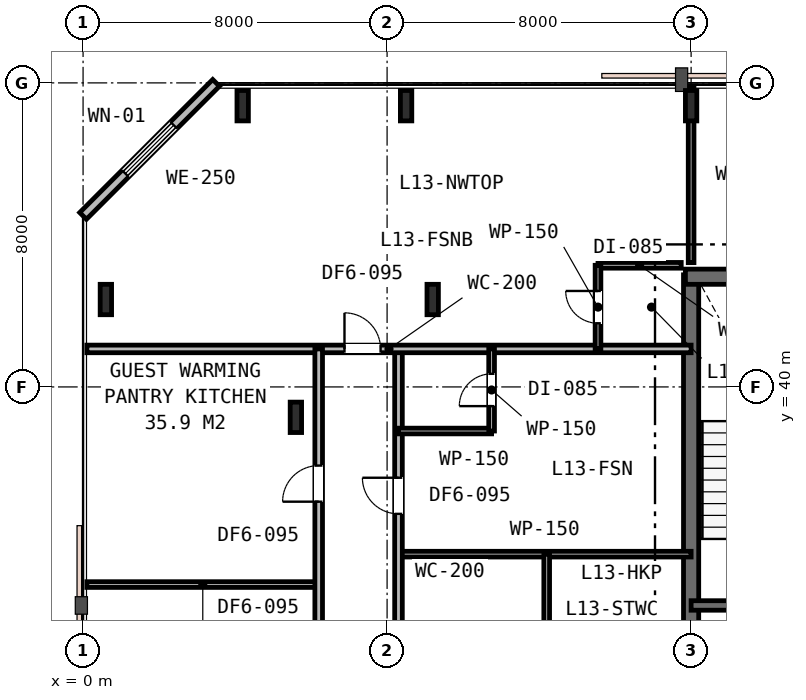
"""IFC4 building model, lengths in metres.
Left out: names, types, materials, properties, quantities, classifications, styles, units other than length and angle.
Written with IfcOpenShell. Run it as: python <this file> out.ifc"""

import sys

from ifc_helpers import new_model, si_unit, direction, frame, frame_2d, origin, origin_2d, place, context, subcontext, project, spatial, rectangle, i_section, extrude, element, fill, save


model = new_model("IFC4")
c1 = context("Model", 3, precision=1e-05, world=origin(), true_north=direction((0.0, 1.0)))
c2 = subcontext(c1, "Body", "Model", "MODEL_VIEW")
j1 = project(units=[si_unit("LENGTHUNIT", "METRE"), si_unit("PLANEANGLEUNIT", "RADIAN")], contexts=[c1])
p1 = place(None, origin())
s1 = spatial("IfcSite", under=j1, at=p1, CompositionType="ELEMENT")
p2 = place(p1, origin())
s2 = spatial("IfcBuilding", under=s1, at=p2, CompositionType="ELEMENT")
p3 = place(p2, frame((0.0, 0.0, 54.6)))
s3 = spatial("IfcBuildingStorey", under=s2, at=p3, CompositionType="ELEMENT", Elevation=54.6)
p4 = place(p3, frame((16.0, 30.65, 0.0), z_axis=(0.0, 0.0, 1.0), x_axis=(0.0, 1.0, 0.0)))
e1 = element("IfcWall", 1, at=p4, inside=s3, PredefinedType="SHEAR", context=c2, shape_type="SweptSolid", body=[
    extrude(rectangle(XDim=12.3, YDim=0.4, at=frame_2d((6.15, 0.0))), origin(), (0.0, 0.0, 1.0), 3.6),
])
p5 = place(p3, frame((15.85, 42.9, 0.0), z_axis=(0.0, 0.0, 1.0), x_axis=(1.0, 0.0, 0.0)))
e2 = element("IfcWall", 2, at=p5, inside=s3, PredefinedType="SHEAR", context=c2, shape_type="SweptSolid", body=[
    extrude(rectangle(XDim=24.3, YDim=0.4, at=frame_2d((12.15, 0.0))), origin(), (0.0, 0.0, 1.0), 3.6),
])
p6 = place(p3, frame((16.0, 34.25, 0.0), z_axis=(0.0, 0.0, 1.0), x_axis=(1.0, 0.0, 0.0)))
e3 = element("IfcWall", 3, at=p6, inside=s3, PredefinedType="SHEAR", context=c2, shape_type="SweptSolid", body=[
    extrude(rectangle(XDim=6.05, YDim=0.25, at=frame_2d((3.025, 0.0))), origin(), (0.0, 0.0, 1.0), 3.6),
])
p7 = place(p6, frame((1.25, 0.0, 0.0)))
e4 = element("IfcOpeningElement", 4, at=p7, cuts=e3, PredefinedType="OPENING", context=c2, shape_type="SweptSolid", body=[
    extrude(rectangle(XDim=1.0, YDim=2.15, at=frame_2d((0.5, 1.075))), frame((0.0, 0.135, 0.0), z_axis=(0.0, -1.0, 0.0), x_axis=(1.0, 0.0, 0.0)), (0.0, 0.0, 1.0), 0.27),
])
p8 = place(p6, frame((4.2, 0.0, 0.0)))
e5 = element("IfcOpeningElement", 5, at=p8, cuts=e3, PredefinedType="OPENING", context=c2, shape_type="SweptSolid", body=[
    extrude(rectangle(XDim=1.1, YDim=2.15, at=frame_2d((0.55, 1.075))), frame((0.0, 0.135, 0.0), z_axis=(0.0, -1.0, 0.0), x_axis=(1.0, 0.0, 0.0)), (0.0, 0.0, 1.0), 0.27),
])
for number, where, z_axis, x_axis in (
    (6, (5.6, 39.2, 0.0), (0.0, 0.0, 1.0), (1.0, 0.0, 0.0)),
    (7, (9.2, 42.3, 0.0), (0.0, 0.0, 1.0), (1.0, 0.0, 0.0)),
    (8, (0.6, 42.3, 0.0), (0.0, 0.0, 1.0), (1.0, 0.0, 0.0)),
    (9, (4.2, 47.4, 0.0), (0.0, 0.0, 1.0), (1.0, 0.0, 0.0)),
    (10, (8.5, 47.4, 0.0), (0.0, 0.0, 1.0), (1.0, 0.0, 0.0)),
    (11, (16.0, 47.4, 0.0), (0.0, 0.0, 1.0), (1.0, 0.0, 0.0)),
):
    element("IfcColumn", number, at=place(p3, frame(where, z_axis=z_axis, x_axis=x_axis)), inside=s3, PredefinedType="COLUMN", context=c2, shape_type="SweptSolid", body=[
        extrude(i_section(OverallWidth=0.3, OverallDepth=0.8, WebThickness=0.018, FlangeThickness=0.033, FilletRadius=0.03, at=origin_2d()), origin(), (0.0, 0.0, 1.0), 3.6),
    ])
p9 = place(p3, frame((3.5, 48.0, 0.0), z_axis=(0.0, 0.0, 1.0), x_axis=(-0.707106781187, -0.707106781187, 0.0)))
e12 = element("IfcWall", 12, at=p9, inside=s3, PredefinedType="STANDARD", context=c2, shape_type="SweptSolid", body=[
    extrude(rectangle(XDim=4.95, YDim=0.25, at=frame_2d((2.475, 0.0))), origin(), (0.0, 0.0, 1.0), 3.33),
])
p10 = place(p9, frame((1.575, 0.0, 0.75)))
e13 = element("IfcOpeningElement", 13, at=p10, cuts=e12, PredefinedType="OPENING", context=c2, shape_type="SweptSolid", body=[
    extrude(rectangle(XDim=1.8, YDim=1.85, at=frame_2d((0.9, 0.925))), frame((0.0, 0.135, 0.0), z_axis=(0.0, -1.0, 0.0), x_axis=(1.0, 0.0, 0.0)), (0.0, 0.0, 1.0), 0.27),
])
p11 = place(p3, frame((8.3, 35.6, 0.0), z_axis=(0.0, 0.0, 1.0), x_axis=(1.0, 0.0, 0.0)))
e14 = element("IfcWall", 14, at=p11, inside=s3, PredefinedType="PARTITIONING", context=c2, shape_type="SweptSolid", body=[
    extrude(rectangle(XDim=7.7, YDim=0.15, at=frame_2d((3.85, 0.0))), origin(), (0.0, 0.0, 1.0), 2.82),
])
p12 = place(p3, frame((12.2, 30.8, 0.0), z_axis=(0.0, 0.0, 1.0), x_axis=(0.0, 1.0, 0.0)))
e15 = element("IfcWall", 15, at=p12, inside=s3, PredefinedType="PARTITIONING", context=c2, shape_type="SweptSolid", body=[
    extrude(rectangle(XDim=4.8, YDim=0.15, at=frame_2d((2.4, 0.0))), origin(), (0.0, 0.0, 1.0), 2.82),
])
p13 = place(p3, frame((8.3, 30.8, 0.0), z_axis=(0.0, 0.0, 1.0), x_axis=(0.0, 1.0, 0.0)))
e16 = element("IfcWall", 16, at=p13, inside=s3, PredefinedType="PARTITIONING", context=c2, shape_type="SweptSolid", body=[
    extrude(rectangle(XDim=10.2, YDim=0.2, at=frame_2d((5.1, 0.0))), origin(), (0.0, 0.0, 1.0), 2.82),
])
p14 = place(p13, frame((1.95, 0.0, 0.0)))
e17 = element("IfcOpeningElement", 17, at=p14, cuts=e16, PredefinedType="OPENING", context=c2, shape_type="SweptSolid", body=[
    extrude(rectangle(XDim=0.9, YDim=2.15, at=frame_2d((0.45, 1.075))), frame((0.0, 0.11, 0.0), z_axis=(0.0, -1.0, 0.0), x_axis=(1.0, 0.0, 0.0)), (0.0, 0.0, 1.0), 0.22),
])
p15 = place(p13, frame((5.861, 0.0, 0.0)))
e18 = element("IfcOpeningElement", 18, at=p15, cuts=e16, PredefinedType="OPENING", context=c2, shape_type="SweptSolid", body=[
    extrude(rectangle(XDim=0.95, YDim=2.15, at=frame_2d((0.475, 1.075))), frame((0.0, 0.11, 0.0), z_axis=(0.0, -1.0, 0.0), x_axis=(1.0, 0.0, 0.0)), (0.0, 0.0, 1.0), 0.22),
])
p16 = place(p3, frame((0.1, 41.0, 0.0), z_axis=(0.0, 0.0, 1.0), x_axis=(1.0, 0.0, 0.0)))
e19 = element("IfcWall", 19, at=p16, inside=s3, PredefinedType="PARTITIONING", context=c2, shape_type="SweptSolid", body=[
    extrude(rectangle(XDim=15.9, YDim=0.2, at=frame_2d((7.95, 0.0))), origin(), (0.0, 0.0, 1.0), 2.82),
])
p17 = place(p16, frame((6.779, 0.0, 0.0)))
e20 = element("IfcOpeningElement", 20, at=p17, cuts=e19, PredefinedType="OPENING", context=c2, shape_type="SweptSolid", body=[
    extrude(rectangle(XDim=0.95, YDim=2.15, at=frame_2d((0.475, 1.075))), frame((0.0, 0.11, 0.0), z_axis=(0.0, -1.0, 0.0), x_axis=(1.0, 0.0, 0.0)), (0.0, 0.0, 1.0), 0.22),
])
p18 = place(p3, frame((13.55, 43.2, 0.0), z_axis=(0.0, 0.0, 1.0), x_axis=(1.0, 0.0, 0.0)))
e21 = element("IfcWall", 21, at=p18, inside=s3, PredefinedType="PARTITIONING", context=c2, shape_type="SweptSolid", body=[
    extrude(rectangle(XDim=2.19, YDim=0.15, at=frame_2d((1.095, 0.0))), origin(), (0.0, 0.0, 1.0), 3.33),
])
p19 = place(p3, frame((13.55, 41.0, 0.0), z_axis=(0.0, 0.0, 1.0), x_axis=(0.0, 1.0, 0.0)))
e22 = element("IfcWall", 22, at=p19, inside=s3, PredefinedType="PARTITIONING", context=c2, shape_type="SweptSolid", body=[
    extrude(rectangle(XDim=2.2, YDim=0.15, at=frame_2d((1.1, 0.0))), origin(), (0.0, 0.0, 1.0), 3.33),
])
p20 = place(p19, frame((0.675, 0.0, 0.0)))
e23 = element("IfcOpeningElement", 23, at=p20, cuts=e22, PredefinedType="OPENING", context=c2, shape_type="SweptSolid", body=[
    extrude(rectangle(XDim=0.85, YDim=2.15, at=frame_2d((0.425, 1.075))), frame((0.0, 0.085, 0.0), z_axis=(0.0, -1.0, 0.0), x_axis=(1.0, 0.0, 0.0)), (0.0, 0.0, 1.0), 0.17),
])
p21 = place(p3, frame((0.1, 34.8, 0.0), z_axis=(0.0, 0.0, 1.0), x_axis=(1.0, 0.0, 0.0)))
e24 = element("IfcWall", 24, at=p21, inside=s3, PredefinedType="PARTITIONING", context=c2, shape_type="SweptSolid", body=[
    extrude(rectangle(XDim=6.1, YDim=0.15, at=frame_2d((3.05, 0.0))), origin(), (0.0, 0.0, 1.0), 2.82),
])
p22 = place(p3, frame((6.2, 28.6, 0.0), z_axis=(0.0, 0.0, 1.0), x_axis=(0.0, 1.0, 0.0)))
e25 = element("IfcWall", 25, at=p22, inside=s3, PredefinedType="PARTITIONING", context=c2, shape_type="SweptSolid", body=[
    extrude(rectangle(XDim=12.4, YDim=0.2, at=frame_2d((6.2, 0.0))), origin(), (0.0, 0.0, 1.0), 2.82),
])
p23 = place(p22, frame((3.725, 0.0, 0.0)))
e26 = element("IfcOpeningElement", 26, at=p23, cuts=e25, PredefinedType="OPENING", context=c2, shape_type="SweptSolid", body=[
    extrude(rectangle(XDim=0.95, YDim=2.15, at=frame_2d((0.475, 1.075))), frame((0.0, 0.11, 0.0), z_axis=(0.0, -1.0, 0.0), x_axis=(1.0, 0.0, 0.0)), (0.0, 0.0, 1.0), 0.22),
])
p24 = place(p22, frame((8.381, 0.0, 0.0)))
e27 = element("IfcOpeningElement", 27, at=p24, cuts=e25, PredefinedType="OPENING", context=c2, shape_type="SweptSolid", body=[
    extrude(rectangle(XDim=0.95, YDim=2.15, at=frame_2d((0.475, 1.075))), frame((0.0, 0.11, 0.0), z_axis=(0.0, -1.0, 0.0), x_axis=(1.0, 0.0, 0.0)), (0.0, 0.0, 1.0), 0.22),
])
p25 = place(p3, frame((8.3, 38.84, 0.0), z_axis=(0.0, 0.0, 1.0), x_axis=(1.0, 0.0, 0.0)))
e28 = element("IfcWall", 28, at=p25, inside=s3, PredefinedType="PARTITIONING", context=c2, shape_type="SweptSolid", body=[
    extrude(rectangle(XDim=2.45, YDim=0.15, at=frame_2d((1.225, 0.0))), origin(), (0.0, 0.0, 1.0), 2.82),
])
p26 = place(p3, frame((10.75, 38.84, 0.0), z_axis=(0.0, 0.0, 1.0), x_axis=(0.0, 1.0, 0.0)))
e29 = element("IfcWall", 29, at=p26, inside=s3, PredefinedType="PARTITIONING", context=c2, shape_type="SweptSolid", body=[
    extrude(rectangle(XDim=2.16, YDim=0.15, at=frame_2d((1.08, 0.0))), origin(), (0.0, 0.0, 1.0), 3.33),
])
p27 = place(p26, frame((0.655, 0.0, 0.0)))
e30 = element("IfcOpeningElement", 30, at=p27, cuts=e29, PredefinedType="OPENING", context=c2, shape_type="SweptSolid", body=[
    extrude(rectangle(XDim=0.85, YDim=2.15, at=frame_2d((0.425, 1.075))), frame((0.0, 0.085, 0.0), z_axis=(0.0, -1.0, 0.0), x_axis=(1.0, 0.0, 0.0)), (0.0, 0.0, 1.0), 0.17),
])
p28 = place(p3, frame((16.0, 43.27, 0.0), z_axis=(0.0, 0.0, 1.0), x_axis=(0.0, 1.0, 0.0)))
e31 = element("IfcWall", 31, at=p28, inside=s3, PredefinedType="PARTITIONING", context=c2, shape_type="SweptSolid", body=[
    extrude(rectangle(XDim=4.63, YDim=0.15, at=frame_2d((2.315, 0.0))), origin(), (0.0, 0.0, 1.0), 2.93),
])
p29 = place(p10, origin())
e32 = element("IfcWindow", 32, at=p29, inside=s3, PartitioningType="SINGLE_PANEL", PredefinedType="WINDOW", context=c2, shape_type="SweptSolid", body=[
    extrude(rectangle(XDim=1.8, YDim=1.85, at=frame_2d((0.9, 0.925))), frame((0.0, 0.03, 0.0), z_axis=(0.0, -1.0, 0.0), x_axis=(1.0, 0.0, 0.0)), (0.0, 0.0, 1.0), 0.06),
])
fill(e13, e32)
p30 = place(p17, origin())
e33 = element("IfcDoor", 33, at=p30, inside=s3, OperationType="SINGLE_SWING_LEFT", PredefinedType="DOOR", context=c2, shape_type="SweptSolid", body=[
    extrude(rectangle(XDim=0.95, YDim=2.15, at=frame_2d((0.475, 1.075))), frame((0.0, 0.025, 0.0), z_axis=(0.0, -1.0, 0.0), x_axis=(1.0, 0.0, 0.0)), (0.0, 0.0, 1.0), 0.05),
])
fill(e20, e33)
p31 = place(p20, origin())
e34 = element("IfcDoor", 34, at=p31, inside=s3, OperationType="SINGLE_SWING_RIGHT", PredefinedType="DOOR", context=c2, shape_type="SweptSolid", body=[
    extrude(rectangle(XDim=0.85, YDim=2.15, at=frame_2d((0.425, 1.075))), frame((0.0, 0.025, 0.0), z_axis=(0.0, -1.0, 0.0), x_axis=(1.0, 0.0, 0.0)), (0.0, 0.0, 1.0), 0.05),
])
fill(e23, e34)
p32 = place(p24, origin())
e35 = element("IfcDoor", 35, at=p32, inside=s3, OperationType="SINGLE_SWING_LEFT", PredefinedType="DOOR", context=c2, shape_type="SweptSolid", body=[
    extrude(rectangle(XDim=0.95, YDim=2.15, at=frame_2d((0.475, 1.075))), frame((0.0, 0.025, 0.0), z_axis=(0.0, -1.0, 0.0), x_axis=(1.0, 0.0, 0.0)), (0.0, 0.0, 1.0), 0.05),
])
fill(e27, e35)
p33 = place(p15, origin())
e36 = element("IfcDoor", 36, at=p33, inside=s3, OperationType="SINGLE_SWING_RIGHT", PredefinedType="DOOR", context=c2, shape_type="SweptSolid", body=[
    extrude(rectangle(XDim=0.95, YDim=2.15, at=frame_2d((0.475, 1.075))), frame((0.0, 0.025, 0.0), z_axis=(0.0, -1.0, 0.0), x_axis=(1.0, 0.0, 0.0)), (0.0, 0.0, 1.0), 0.05),
])
fill(e18, e36)
p34 = place(p27, origin())
e37 = element("IfcDoor", 37, at=p34, inside=s3, OperationType="SINGLE_SWING_LEFT", PredefinedType="DOOR", context=c2, shape_type="SweptSolid", body=[
    extrude(rectangle(XDim=0.85, YDim=2.15, at=frame_2d((0.425, 1.075))), frame((0.0, 0.025, 0.0), z_axis=(0.0, -1.0, 0.0), x_axis=(1.0, 0.0, 0.0)), (0.0, 0.0, 1.0), 0.05),
])
fill(e30, e37)
save(model, sys.argv[1])
